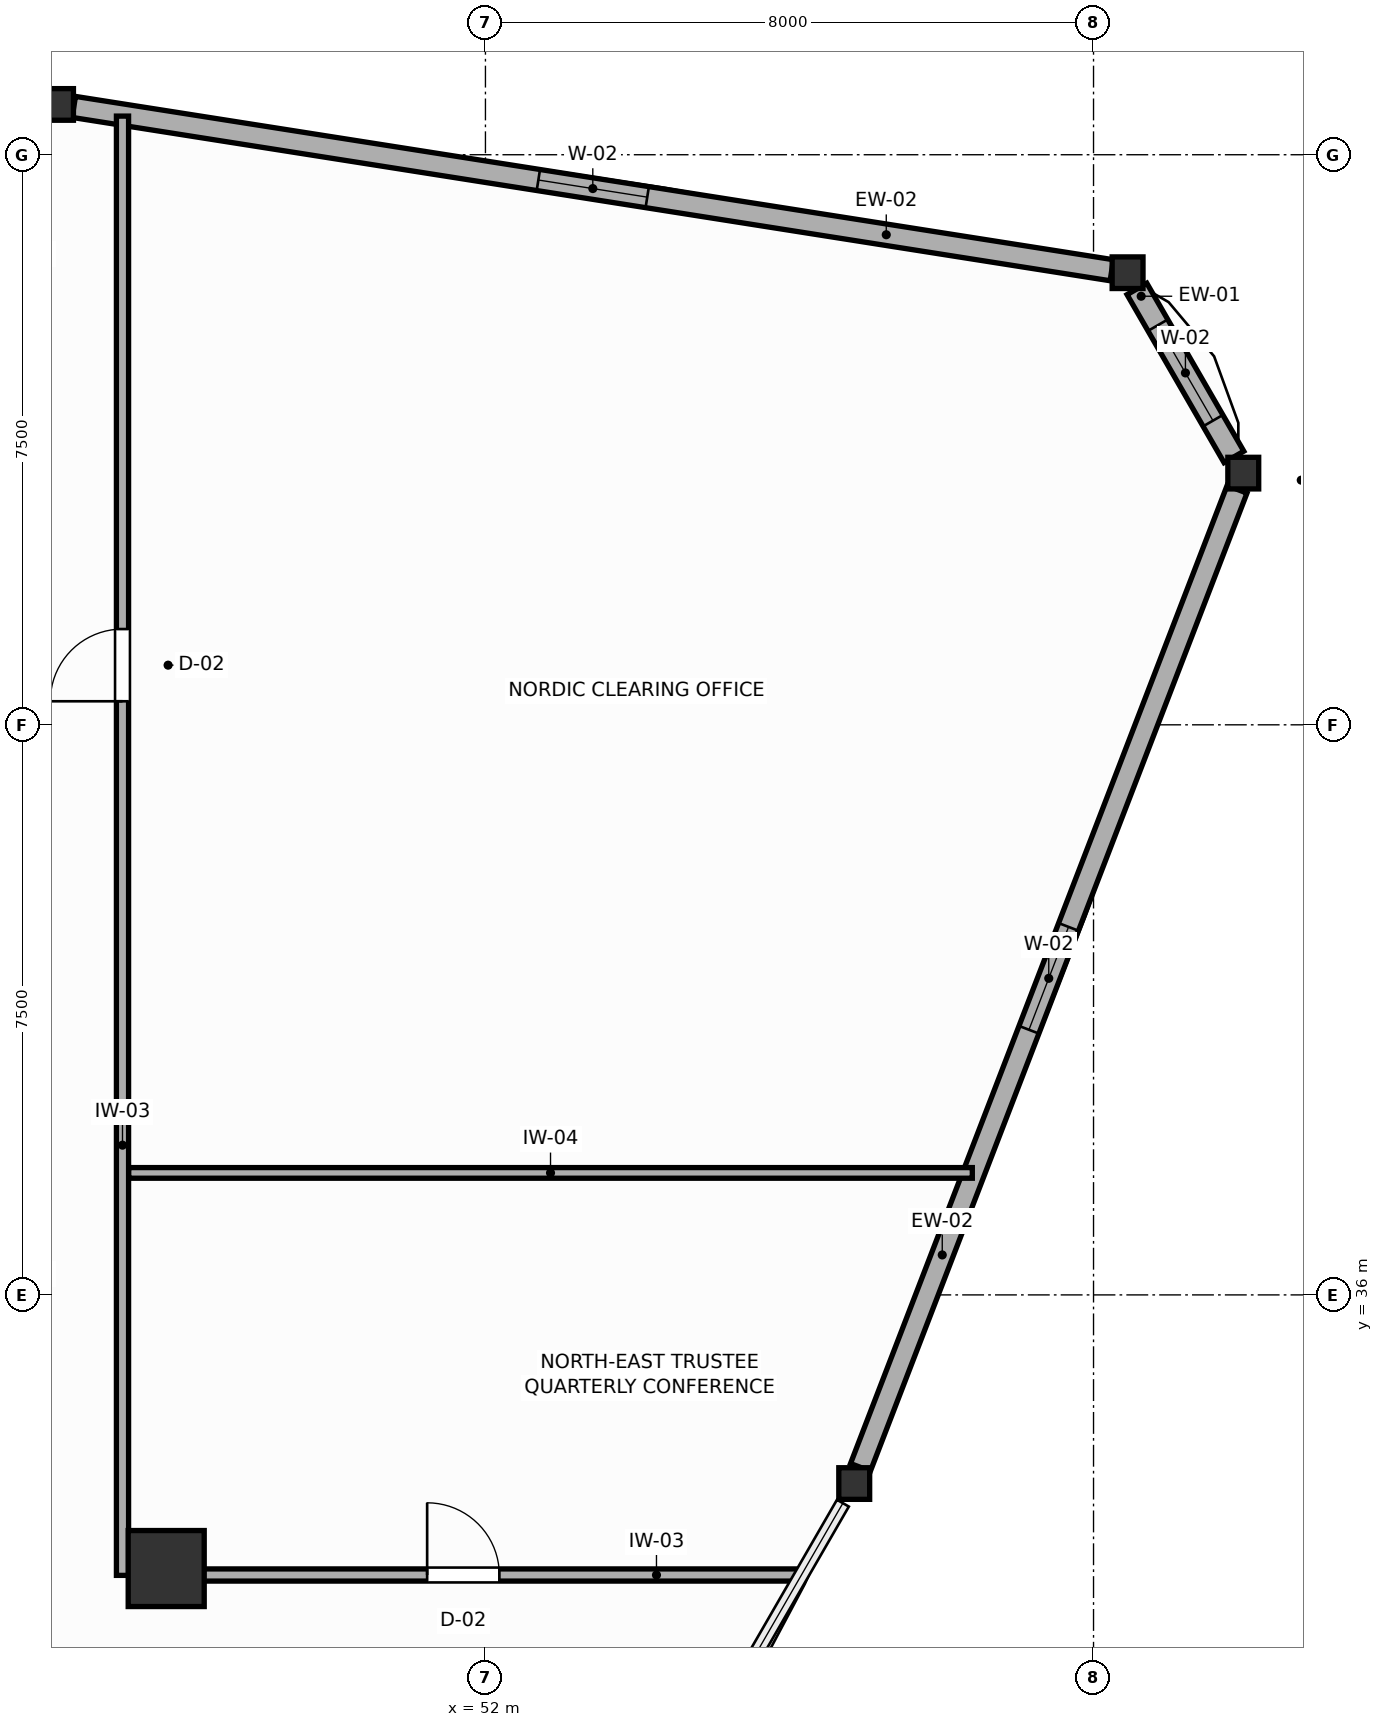
"""IFC4 building model, lengths in metres.
Left out: names, types, materials, properties, quantities, classifications, styles, units other than length and angle.
Written with IfcOpenShell. Run it as: python <this file> out.ifc"""

import sys

from ifc_helpers import new_model, si_unit, direction, frame, frame_2d, origin, origin_2d, place, context, subcontext, project, spatial, rectangle, i_section, extrude, source, transform, mapped, element, fill, save


model = new_model("IFC4")
c1 = context("Model", 3, precision=1e-05, world=origin(), true_north=direction((0.0, 1.0)))
c2 = subcontext(c1, "Body", "Model", "MODEL_VIEW")
j1 = project(units=[si_unit("LENGTHUNIT", "METRE"), si_unit("PLANEANGLEUNIT", "RADIAN")], contexts=[c1])
p1 = place(None, origin())
s1 = spatial("IfcSite", under=j1, at=p1, CompositionType="ELEMENT")
p2 = place(p1, origin())
s2 = spatial("IfcBuilding", under=s1, at=p2, CompositionType="ELEMENT")
p3 = place(p2, frame((0.0, 0.0, 209.4)))
s3 = spatial("IfcBuildingStorey", under=s2, at=p3, CompositionType="ELEMENT", Elevation=209.4)
m1 = source(origin(), c2, "Body", "SweptSolid", [
    extrude(rectangle(XDim=1.0, YDim=1.0, at=origin_2d()), origin(), (0.0, 0.0, 1.0), 3.6),
])
p4 = place(p3, frame((47.8, 32.4, 0.0), z_axis=(0.0, 0.0, 1.0), x_axis=(1.0, 0.0, 0.0)))
e1 = element("IfcColumn", 1, at=p4, inside=s3, PredefinedType="COLUMN", context=c2, shape_type="MappedRepresentation", body=[
    mapped(m1, transform((0.0, 0.0, 0.0), scale=1.0)),
])
m2 = source(origin(), c2, "Body", "SweptSolid", [
    extrude(i_section(OverallWidth=0.406, OverallDepth=0.416, WebThickness=0.027, FlangeThickness=0.044, FilletRadius=0.015, at=origin_2d()), origin(), (0.0, 0.0, 1.0), 3.6),
])
for number, where, z_axis, x_axis in (
    (2, (61.97, 46.811, 0.0), (0.0, 0.0, 1.0), (1.0, 0.0, 0.0)),
    (3, (60.448, 49.448, 0.0), (0.0, 0.0, 1.0), (1.0, 0.0, 0.0)),
    (4, (46.377, 51.662, 0.0), (0.0, 0.0, 1.0), (1.0, 0.0, 0.0)),
    (5, (56.852, 33.518, 0.0), (0.0, 0.0, 1.0), (1.0, 0.0, 0.0)),
):
    element("IfcColumn", number, at=place(p3, frame(where, z_axis=z_axis, x_axis=x_axis)), inside=s3, PredefinedType="COLUMN", context=c2, shape_type="MappedRepresentation", body=[
        mapped(m2, transform((0.0, 0.0, 0.0), scale=1.0)),
    ])
p5 = place(p3, frame((61.847, 47.024, 0.0), z_axis=(0.0, 0.0, 1.0), x_axis=(-0.49997637333, 0.866039044219, 0.0)))
e6 = element("IfcWall", 6, at=p5, inside=s3, PredefinedType="SOLIDWALL", context=c2, shape_type="SweptSolid", body=[
    extrude(rectangle(XDim=2.552, YDim=0.3, at=frame_2d((1.276, 0.0))), origin(), (0.0, 0.0, 1.0), 3.02),
])
p6 = place(p5, frame((0.551, 0.0, 0.75)))
e7 = element("IfcOpeningElement", 7, at=p6, cuts=e6, PredefinedType="OPENING", context=c2, shape_type="SweptSolid", body=[
    extrude(rectangle(XDim=1.45, YDim=1.65, at=frame_2d((0.725, 0.825))), frame((0.0, 0.16, 0.0), z_axis=(0.0, -1.0, 0.0), x_axis=(1.0, 0.0, 0.0)), (0.0, 0.0, 1.0), 0.32),
])
p7 = place(p3, frame((60.24, 49.48, 0.0), z_axis=(0.0, 0.0, 1.0), x_axis=(-0.987848165878, 0.155422009936, 0.0)))
e8 = element("IfcWall", 8, at=p7, inside=s3, PredefinedType="SOLIDWALL", context=c2, shape_type="SweptSolid", body=[
    extrude(rectangle(XDim=13.823, YDim=0.28, at=frame_2d((6.912, 0.0))), origin(), (0.0, 0.0, 1.0), 3.02),
])
p8 = place(p7, frame((6.187, 0.0, 0.75)))
e9 = element("IfcOpeningElement", 9, at=p8, cuts=e8, PredefinedType="OPENING", context=c2, shape_type="SweptSolid", body=[
    extrude(rectangle(XDim=1.45, YDim=1.65, at=frame_2d((0.725, 0.825))), frame((0.0, 0.15, 0.0), z_axis=(0.0, -1.0, 0.0), x_axis=(1.0, 0.0, 0.0)), (0.0, 0.0, 1.0), 0.3),
])
p9 = place(p3, frame((56.934, 33.731, 0.0), z_axis=(0.0, 0.0, 1.0), x_axis=(0.359321962573, 0.933213655715, 0.0)))
e10 = element("IfcWall", 10, at=p9, inside=s3, PredefinedType="SOLIDWALL", context=c2, shape_type="SweptSolid", body=[
    extrude(rectangle(XDim=13.788, YDim=0.28, at=frame_2d((6.894, 0.0))), origin(), (0.0, 0.0, 1.0), 3.02),
])
p10 = place(p9, frame((6.169, 0.0, 0.75)))
e11 = element("IfcOpeningElement", 11, at=p10, cuts=e10, PredefinedType="OPENING", context=c2, shape_type="SweptSolid", body=[
    extrude(rectangle(XDim=1.45, YDim=1.65, at=frame_2d((0.725, 0.825))), frame((0.0, 0.15, 0.0), z_axis=(0.0, -1.0, 0.0), x_axis=(1.0, 0.0, 0.0)), (0.0, 0.0, 1.0), 0.3),
])
p11 = place(p3, frame((47.225, 32.31, 0.0), z_axis=(0.0, 0.0, 1.0), x_axis=(0.0, 1.0, 0.0)))
e12 = element("IfcWall", 12, at=p11, inside=s3, PredefinedType="PARTITIONING", context=c2, shape_type="SweptSolid", body=[
    extrude(rectangle(XDim=19.198, YDim=0.16, at=frame_2d((9.599, 0.0))), origin(), (0.0, 0.0, 1.0), 3.41),
])
p12 = place(p11, frame((11.5, 0.0, 0.0)))
e13 = element("IfcOpeningElement", 13, at=p12, cuts=e12, PredefinedType="OPENING", context=c2, shape_type="SweptSolid", body=[
    extrude(rectangle(XDim=0.95, YDim=2.05, at=frame_2d((0.475, 1.025))), frame((0.0, 0.09, 0.0), z_axis=(0.0, -1.0, 0.0), x_axis=(1.0, 0.0, 0.0)), (0.0, 0.0, 1.0), 0.18),
])
p13 = place(p3, frame((47.307, 32.315, 0.0), z_axis=(0.0, 0.0, 1.0), x_axis=(1.0, 0.0, 0.0)))
e14 = element("IfcWall", 14, at=p13, inside=s3, PredefinedType="PARTITIONING", context=c2, shape_type="SweptSolid", body=[
    extrude(rectangle(XDim=8.83, YDim=0.16, at=frame_2d((4.415, 0.0))), origin(), (0.0, 0.0, 1.0), 2.96),
])
p14 = place(p13, frame((3.926, 0.0, 0.0)))
e15 = element("IfcOpeningElement", 15, at=p14, cuts=e14, PredefinedType="OPENING", context=c2, shape_type="SweptSolid", body=[
    extrude(rectangle(XDim=0.95, YDim=2.05, at=frame_2d((0.475, 1.025))), frame((0.0, 0.09, 0.0), z_axis=(0.0, -1.0, 0.0), x_axis=(1.0, 0.0, 0.0)), (0.0, 0.0, 1.0), 0.18),
])
p15 = place(p3, frame((47.307, 37.605, 0.0), z_axis=(0.0, 0.0, 1.0), x_axis=(1.0, 0.0, 0.0)))
e16 = element("IfcWall", 16, at=p15, inside=s3, PredefinedType="PARTITIONING", context=c2, shape_type="SweptSolid", body=[
    extrude(rectangle(XDim=11.098, YDim=0.14, at=frame_2d((5.549, 0.0))), origin(), (0.0, 0.0, 1.0), 3.41),
])
p16 = place(p6, origin())
e17 = element("IfcWindow", 17, at=p16, inside=s3, PartitioningType="SINGLE_PANEL", PredefinedType="WINDOW", context=c2, shape_type="SweptSolid", body=[
    extrude(rectangle(XDim=1.45, YDim=1.65, at=frame_2d((0.725, 0.825))), frame((0.0, 0.03, 0.0), z_axis=(0.0, -1.0, 0.0), x_axis=(1.0, 0.0, 0.0)), (0.0, 0.0, 1.0), 0.06),
])
fill(e7, e17)
p17 = place(p8, origin())
e18 = element("IfcWindow", 18, at=p17, inside=s3, PartitioningType="SINGLE_PANEL", PredefinedType="WINDOW", context=c2, shape_type="SweptSolid", body=[
    extrude(rectangle(XDim=1.45, YDim=1.65, at=frame_2d((0.725, 0.825))), frame((0.0, 0.03, 0.0), z_axis=(0.0, -1.0, 0.0), x_axis=(1.0, 0.0, 0.0)), (0.0, 0.0, 1.0), 0.06),
])
fill(e9, e18)
p18 = place(p10, origin())
e19 = element("IfcWindow", 19, at=p18, inside=s3, PartitioningType="SINGLE_PANEL", PredefinedType="WINDOW", context=c2, shape_type="SweptSolid", body=[
    extrude(rectangle(XDim=1.45, YDim=1.65, at=frame_2d((0.725, 0.825))), frame((0.0, 0.03, 0.0), z_axis=(0.0, -1.0, 0.0), x_axis=(1.0, 0.0, 0.0)), (0.0, 0.0, 1.0), 0.06),
])
fill(e11, e19)
p19 = place(p12, origin())
e20 = element("IfcDoor", 20, at=p19, inside=s3, OperationType="SINGLE_SWING_LEFT", PredefinedType="DOOR", context=c2, shape_type="SweptSolid", body=[
    extrude(rectangle(XDim=0.95, YDim=2.05, at=frame_2d((0.475, 1.025))), frame((0.0, 0.025, 0.0), z_axis=(0.0, -1.0, 0.0), x_axis=(1.0, 0.0, 0.0)), (0.0, 0.0, 1.0), 0.05),
])
fill(e13, e20)
p20 = place(p14, origin())
e21 = element("IfcDoor", 21, at=p20, inside=s3, OperationType="SINGLE_SWING_LEFT", PredefinedType="DOOR", context=c2, shape_type="SweptSolid", body=[
    extrude(rectangle(XDim=0.95, YDim=2.05, at=frame_2d((0.475, 1.025))), frame((0.0, 0.025, 0.0), z_axis=(0.0, -1.0, 0.0), x_axis=(1.0, 0.0, 0.0)), (0.0, 0.0, 1.0), 0.05),
])
fill(e15, e21)
save(model, sys.argv[1])
